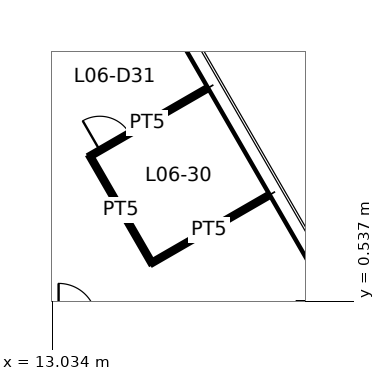
"""IFC4 building model, lengths in metres.
Left out: names, types, materials, properties, quantities, classifications, styles, units other than length and angle.
Written with IfcOpenShell. Run it as: python <this file> out.ifc"""

import sys

from ifc_helpers import new_model, si_unit, direction, frame, frame_2d, origin, place, context, subcontext, project, spatial, rectangle, extrude, element, fill, save


model = new_model("IFC4")
c1 = context("Model", 3, precision=1e-05, world=origin(), true_north=direction((0.0, 1.0)))
c2 = subcontext(c1, "Body", "Model", "MODEL_VIEW")
j1 = project(units=[si_unit("LENGTHUNIT", "METRE"), si_unit("PLANEANGLEUNIT", "RADIAN")], contexts=[c1])
p1 = place(None, origin())
s1 = spatial("IfcSite", under=j1, at=p1, CompositionType="ELEMENT")
p2 = place(p1, origin())
s2 = spatial("IfcBuilding", under=s1, at=p2, CompositionType="ELEMENT")
p3 = place(p2, frame((0.0, 0.0, 22.6)))
s3 = spatial("IfcBuildingStorey", under=s2, at=p3, CompositionType="ELEMENT", Elevation=22.6)
p4 = place(p3, frame((14.025, 4.349, 0.0), z_axis=(0.0, 0.0, 1.0), x_axis=(0.866043466982, 0.49996871232, 0.0)))
e1 = element("IfcWall", 1, at=p4, inside=s3, PredefinedType="PARTITIONING", context=c2, shape_type="SweptSolid", body=[
    extrude(rectangle(XDim=3.49, YDim=0.1, at=frame_2d((1.745, 0.0))), origin(), (0.0, 0.0, 1.0), 3.2),
])
p5 = place(p4, frame((0.3, 0.0, 0.0)))
e2 = element("IfcOpeningElement", 2, at=p5, cuts=e1, PredefinedType="OPENING", context=c2, shape_type="SweptSolid", body=[
    extrude(rectangle(XDim=0.9, YDim=2.1, at=frame_2d((0.45, 1.05))), frame((0.0, 0.06, 0.0), z_axis=(0.0, -1.0, 0.0), x_axis=(1.0, 0.0, 0.0)), (0.0, 0.0, 1.0), 0.12),
])
p6 = place(p3, frame((15.648, 1.537, 0.0), z_axis=(0.0, 0.0, 1.0), x_axis=(-0.499956811548, 0.866050337213, 0.0)))
e3 = element("IfcWall", 3, at=p6, inside=s3, PredefinedType="PARTITIONING", context=c2, shape_type="SweptSolid", body=[
    extrude(rectangle(XDim=3.246, YDim=0.1, at=frame_2d((1.623, 0.0))), origin(), (0.0, 0.0, 1.0), 3.2),
])
p7 = place(p3, frame((18.662, 3.277, 0.0), z_axis=(0.0, 0.0, 1.0), x_axis=(-0.866037222451, -0.499979528911, 0.0)))
e4 = element("IfcWall", 4, at=p7, inside=s3, PredefinedType="PARTITIONING", context=c2, shape_type="SweptSolid", body=[
    extrude(rectangle(XDim=3.48, YDim=0.1, at=frame_2d((1.74, 0.0))), origin(), (0.0, 0.0, 1.0), 3.2),
])
p8 = place(p5, origin())
e5 = element("IfcDoor", 5, at=p8, inside=s3, OperationType="SINGLE_SWING_LEFT", PredefinedType="DOOR", context=c2, shape_type="SweptSolid", body=[
    extrude(rectangle(XDim=0.9, YDim=2.1, at=frame_2d((0.45, 1.05))), frame((0.0, 0.025, 0.0), z_axis=(0.0, -1.0, 0.0), x_axis=(1.0, 0.0, 0.0)), (0.0, 0.0, 1.0), 0.05),
])
fill(e2, e5)
save(model, sys.argv[1])
